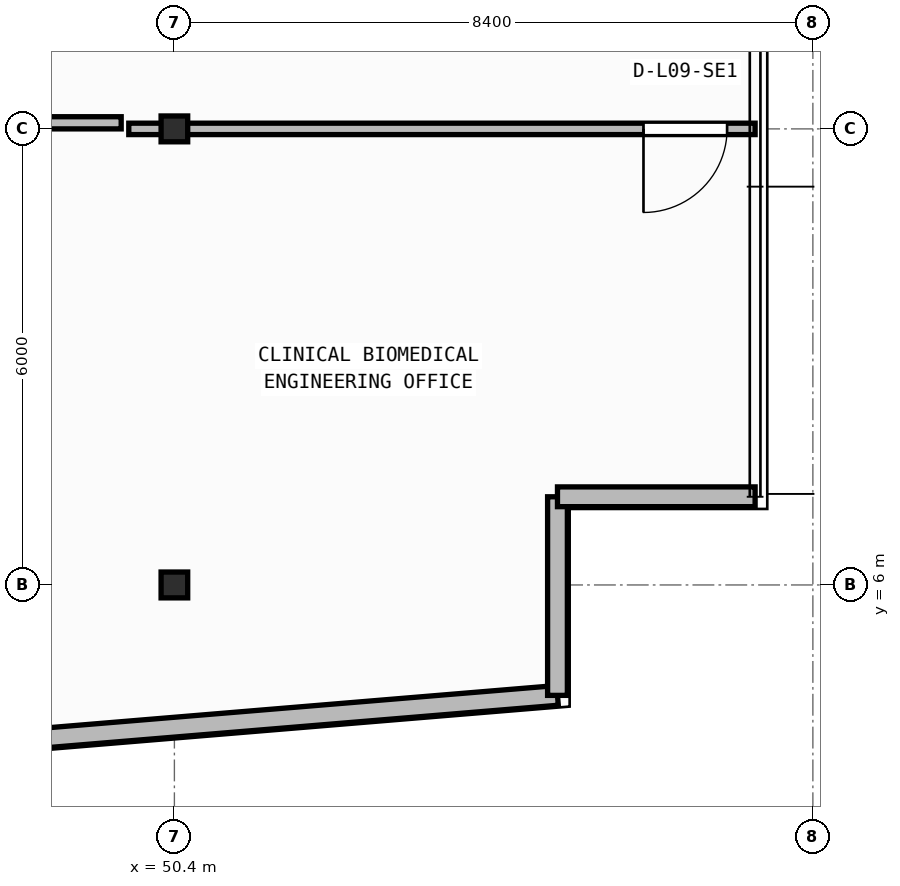
"""IFC4 building model, lengths in metres.
Left out: names, types, materials, properties, quantities, classifications, styles, units other than length and angle.
Written with IfcOpenShell. Run it as: python <this file> out.ifc"""

import sys

from ifc_helpers import new_model, si_unit, direction, frame, frame_2d, origin, origin_2d, place, context, subcontext, project, spatial, rectangle, i_section, extrude, element, fill, save


model = new_model("IFC4")
c1 = context("Model", 3, precision=1e-05, world=origin(), true_north=direction((0.0, 1.0)))
c2 = subcontext(c1, "Body", "Model", "MODEL_VIEW")
j1 = project(units=[si_unit("LENGTHUNIT", "METRE"), si_unit("PLANEANGLEUNIT", "RADIAN")], contexts=[c1])
p1 = place(None, origin())
s1 = spatial("IfcSite", under=j1, at=p1, CompositionType="ELEMENT")
p2 = place(p1, origin())
s2 = spatial("IfcBuilding", under=s1, at=p2, CompositionType="ELEMENT")
p3 = place(p2, frame((0.0, 0.0, 38.3)))
s3 = spatial("IfcBuildingStorey", under=s2, at=p3, CompositionType="ELEMENT", Elevation=38.3)
for number, where, z_axis, x_axis in (
    (1, (50.4, 6.0, 0.0), (0.0, 0.0, 1.0), (1.0, 0.0, 0.0)),
    (2, (50.4, 12.0, 0.0), (0.0, 0.0, 1.0), (1.0, 0.0, 0.0)),
):
    element("IfcColumn", number, at=place(p3, frame(where, z_axis=z_axis, x_axis=x_axis)), inside=s3, PredefinedType="COLUMN", context=c2, shape_type="SweptSolid", body=[
        extrude(i_section(OverallWidth=0.35, OverallDepth=0.34, WebThickness=0.016, FlangeThickness=0.028, at=origin_2d()), origin(), (0.0, 0.0, 1.0), 3.95),
    ])
p4 = place(p3, frame((2.76, 0.174, 0.0), z_axis=(0.0, 0.0, 1.0), x_axis=(0.996571478456, 0.082736257641, 0.0)))
e3 = element("IfcWall", 3, at=p4, inside=s3, PredefinedType="STANDARD", context=c2, shape_type="SweptSolid", body=[
    extrude(rectangle(XDim=52.861, YDim=0.26, at=frame_2d((26.431, 0.0))), origin(), (0.0, 0.0, 1.0), 3.71),
])
p5 = place(p4, frame((25.231, 0.0, 0.9)))
e4 = element("IfcOpeningElement", 4, at=p5, cuts=e3, PredefinedType="OPENING", context=c2, shape_type="SweptSolid", body=[
    extrude(rectangle(XDim=2.4, YDim=1.65, at=frame_2d((1.2, 0.825))), frame((0.0, 0.14, 0.0), z_axis=(0.0, -1.0, 0.0), x_axis=(1.0, 0.0, 0.0)), (0.0, 0.0, 1.0), 0.28),
])
p6 = place(p3, frame((55.44, 4.547, 0.0), z_axis=(0.0, 0.0, 1.0), x_axis=(0.0, 1.0, 0.0)))
e5 = element("IfcWall", 5, at=p6, inside=s3, PredefinedType="STANDARD", context=c2, shape_type="SweptSolid", body=[
    extrude(rectangle(XDim=2.613, YDim=0.26, at=frame_2d((1.306, 0.0))), origin(), (0.0, 0.0, 1.0), 3.71),
])
p7 = place(p3, frame((55.44, 7.16, 0.0), z_axis=(0.0, 0.0, 1.0), x_axis=(1.0, 0.0, 0.0)))
e6 = element("IfcWall", 6, at=p7, inside=s3, PredefinedType="STANDARD", context=c2, shape_type="SweptSolid", body=[
    extrude(rectangle(XDim=2.6, YDim=0.26, at=frame_2d((1.3, 0.0))), origin(), (0.0, 0.0, 1.0), 3.71),
])
p8 = place(p3, frame((58.04, 12.0, 0.0), z_axis=(0.0, 0.0, 1.0), x_axis=(-1.0, 0.0, 0.0)))
e7 = element("IfcWall", 7, at=p8, inside=s3, PredefinedType="PARTITIONING", context=c2, shape_type="SweptSolid", body=[
    extrude(rectangle(XDim=8.24, YDim=0.15, at=frame_2d((4.12, 0.0))), origin(), (0.0, 0.0, 1.0), 3.073),
])
p9 = place(p8, frame((0.368, 0.0, 0.0)))
e8 = element("IfcOpeningElement", 8, at=p9, cuts=e7, PredefinedType="OPENING", context=c2, shape_type="SweptSolid", body=[
    extrude(rectangle(XDim=1.1, YDim=2.1, at=frame_2d((0.55, 1.05))), frame((0.0, 0.085, 0.0), z_axis=(0.0, -1.0, 0.0), x_axis=(1.0, 0.0, 0.0)), (0.0, 0.0, 1.0), 0.17),
])
p10 = place(p3, frame((46.689, 12.08, 0.0), z_axis=(0.0, 0.0, 1.0), x_axis=(1.0, 0.0, 0.0)))
e9 = element("IfcWall", 9, at=p10, inside=s3, PredefinedType="PARTITIONING", context=c2, shape_type="SweptSolid", body=[
    extrude(rectangle(XDim=3.011, YDim=0.16, at=frame_2d((1.505, 0.0))), origin(), (0.0, 0.0, 1.0), 3.073),
])
p11 = place(p9, origin())
e10 = element("IfcDoor", 10, at=p11, inside=s3, OperationType="SINGLE_SWING_RIGHT", PredefinedType="DOOR", context=c2, shape_type="SweptSolid", body=[
    extrude(rectangle(XDim=1.1, YDim=2.1, at=frame_2d((0.55, 1.05))), frame((0.0, 0.025, 0.0), z_axis=(0.0, -1.0, 0.0), x_axis=(1.0, 0.0, 0.0)), (0.0, 0.0, 1.0), 0.05),
])
fill(e8, e10)
save(model, sys.argv[1])
